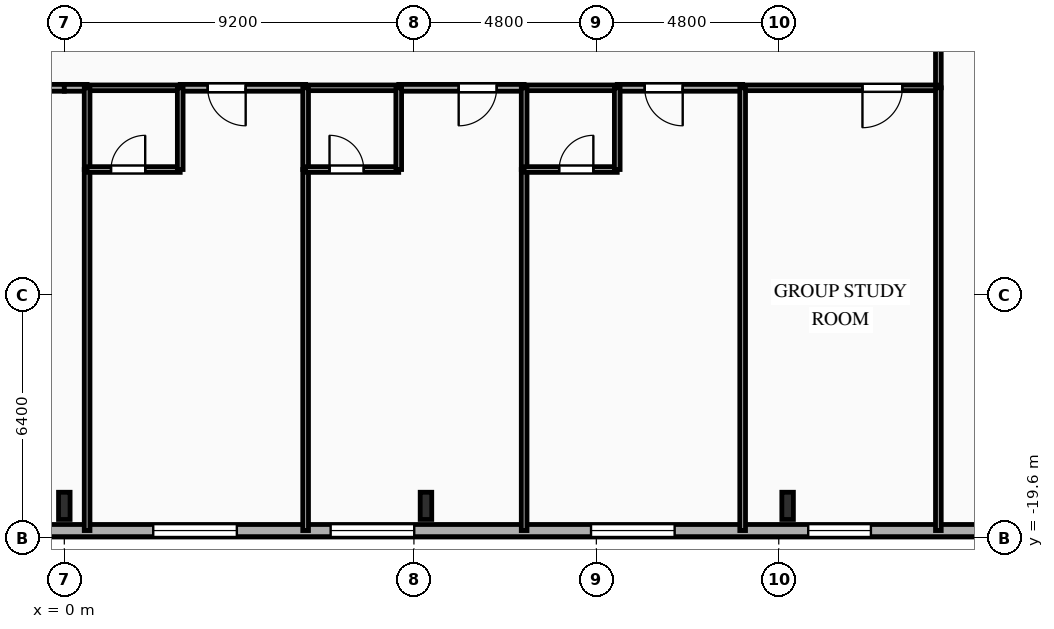
"""IFC4 building model, lengths in metres.
Left out: names, types, materials, properties, quantities, classifications, styles, units other than length and angle.
Written with IfcOpenShell. Run it as: python <this file> out.ifc"""

import sys

from ifc_helpers import new_model, si_unit, direction, frame, frame_2d, origin, origin_2d, place, context, subcontext, project, spatial, rectangle, i_section, extrude, element, fill, save


model = new_model("IFC4")
c1 = context("Model", 3, precision=1e-05, world=origin(), true_north=direction((0.0, 1.0)))
c2 = subcontext(c1, "Body", "Model", "MODEL_VIEW")
j1 = project(units=[si_unit("LENGTHUNIT", "METRE"), si_unit("PLANEANGLEUNIT", "RADIAN")], contexts=[c1])
p1 = place(None, origin())
s1 = spatial("IfcSite", under=j1, at=p1, CompositionType="ELEMENT")
p2 = place(p1, origin())
s2 = spatial("IfcBuilding", under=s1, at=p2, CompositionType="ELEMENT")
p3 = place(p2, frame((0.0, 0.0, 67.2)))
s3 = spatial("IfcBuildingStorey", under=s2, at=p3, CompositionType="ELEMENT", Elevation=67.2)
for number, where, z_axis, x_axis in (
    (1, (0.0, -18.75, 0.0), (0.0, 0.0, 1.0), (1.0, 0.0, 0.0)),
    (2, (9.517, -18.75, 0.0), (0.0, 0.0, 1.0), (1.0, 0.0, 0.0)),
    (3, (19.033, -18.75, 0.0), (0.0, 0.0, 1.0), (1.0, 0.0, 0.0)),
):
    element("IfcColumn", number, at=place(p3, frame(where, z_axis=z_axis, x_axis=x_axis)), inside=s3, PredefinedType="COLUMN", context=c2, shape_type="SweptSolid", body=[
        extrude(i_section(OverallWidth=0.304, OverallDepth=0.716, WebThickness=0.021, FlangeThickness=0.04, FilletRadius=0.027, at=origin_2d()), origin(), (0.0, 0.0, 1.0), 3.35),
    ])
p4 = place(p3, frame((29.2, -19.4, 0.0), z_axis=(0.0, 0.0, 1.0), x_axis=(-1.0, 0.0, 0.0)))
e4 = element("IfcWall", 4, at=p4, inside=s3, PredefinedType="SOLIDWALL", context=c2, shape_type="SweptSolid", body=[
    extrude(rectangle(XDim=58.4, YDim=0.32, at=frame_2d((29.2, 0.0))), origin(), (0.0, 0.0, 1.0), 3.035),
])
p5 = place(p4, frame((2.535, 0.0, 0.85)))
e5 = element("IfcOpeningElement", 5, at=p5, cuts=e4, PredefinedType="OPENING", context=c2, shape_type="SweptSolid", body=[
    extrude(rectangle(XDim=1.65, YDim=1.85, at=frame_2d((0.825, 0.925))), frame((0.0, 0.17, 0.0), z_axis=(0.0, -1.0, 0.0), x_axis=(1.0, 0.0, 0.0)), (0.0, 0.0, 1.0), 0.34),
])
p6 = place(p4, frame((7.975, 0.0, 0.85)))
e6 = element("IfcOpeningElement", 6, at=p6, cuts=e4, PredefinedType="OPENING", context=c2, shape_type="SweptSolid", body=[
    extrude(rectangle(XDim=1.65, YDim=1.85, at=frame_2d((0.825, 0.925))), frame((0.0, 0.17, 0.0), z_axis=(0.0, -1.0, 0.0), x_axis=(1.0, 0.0, 0.0)), (0.0, 0.0, 1.0), 0.34),
])
p7 = place(p4, frame((13.14, 0.0, 0.85)))
e7 = element("IfcOpeningElement", 7, at=p7, cuts=e4, PredefinedType="OPENING", context=c2, shape_type="SweptSolid", body=[
    extrude(rectangle(XDim=2.2, YDim=1.85, at=frame_2d((1.1, 0.925))), frame((0.0, 0.17, 0.0), z_axis=(0.0, -1.0, 0.0), x_axis=(1.0, 0.0, 0.0)), (0.0, 0.0, 1.0), 0.34),
])
p8 = place(p4, frame((19.992, 0.0, 0.85)))
e8 = element("IfcOpeningElement", 8, at=p8, cuts=e4, PredefinedType="OPENING", context=c2, shape_type="SweptSolid", body=[
    extrude(rectangle(XDim=2.2, YDim=1.85, at=frame_2d((1.1, 0.925))), frame((0.0, 0.17, 0.0), z_axis=(0.0, -1.0, 0.0), x_axis=(1.0, 0.0, 0.0)), (0.0, 0.0, 1.0), 0.34),
])
p9 = place(p4, frame((24.66, 0.0, 0.85)))
e9 = element("IfcOpeningElement", 9, at=p9, cuts=e4, PredefinedType="OPENING", context=c2, shape_type="SweptSolid", body=[
    extrude(rectangle(XDim=2.2, YDim=1.85, at=frame_2d((1.1, 0.925))), frame((0.0, 0.17, 0.0), z_axis=(0.0, -1.0, 0.0), x_axis=(1.0, 0.0, 0.0)), (0.0, 0.0, 1.0), 0.34),
])
p10 = place(p4, frame((30.42, 0.0, 0.85)))
e10 = element("IfcOpeningElement", 10, at=p10, cuts=e4, PredefinedType="OPENING", context=c2, shape_type="SweptSolid", body=[
    extrude(rectangle(XDim=2.2, YDim=1.85, at=frame_2d((1.1, 0.925))), frame((0.0, 0.17, 0.0), z_axis=(0.0, -1.0, 0.0), x_axis=(1.0, 0.0, 0.0)), (0.0, 0.0, 1.0), 0.34),
])
p11 = place(p4, frame((36.18, 0.0, 0.85)))
e11 = element("IfcOpeningElement", 11, at=p11, cuts=e4, PredefinedType="OPENING", context=c2, shape_type="SweptSolid", body=[
    extrude(rectangle(XDim=2.2, YDim=1.85, at=frame_2d((1.1, 0.925))), frame((0.0, 0.17, 0.0), z_axis=(0.0, -1.0, 0.0), x_axis=(1.0, 0.0, 0.0)), (0.0, 0.0, 1.0), 0.34),
])
p12 = place(p4, frame((41.94, 0.0, 0.85)))
e12 = element("IfcOpeningElement", 12, at=p12, cuts=e4, PredefinedType="OPENING", context=c2, shape_type="SweptSolid", body=[
    extrude(rectangle(XDim=2.2, YDim=1.85, at=frame_2d((1.1, 0.925))), frame((0.0, 0.17, 0.0), z_axis=(0.0, -1.0, 0.0), x_axis=(1.0, 0.0, 0.0)), (0.0, 0.0, 1.0), 0.34),
])
p13 = place(p4, frame((48.821, 0.0, 0.85)))
e13 = element("IfcOpeningElement", 13, at=p13, cuts=e4, PredefinedType="OPENING", context=c2, shape_type="SweptSolid", body=[
    extrude(rectangle(XDim=1.65, YDim=1.85, at=frame_2d((0.825, 0.925))), frame((0.0, 0.17, 0.0), z_axis=(0.0, -1.0, 0.0), x_axis=(1.0, 0.0, 0.0)), (0.0, 0.0, 1.0), 0.34),
])
p14 = place(p4, frame((53.775, 0.0, 0.85)))
e14 = element("IfcOpeningElement", 14, at=p14, cuts=e4, PredefinedType="OPENING", context=c2, shape_type="SweptSolid", body=[
    extrude(rectangle(XDim=1.65, YDim=1.85, at=frame_2d((0.825, 0.925))), frame((0.0, 0.17, 0.0), z_axis=(0.0, -1.0, 0.0), x_axis=(1.0, 0.0, 0.0)), (0.0, 0.0, 1.0), 0.34),
])
p15 = place(p3, frame((0.0, -7.75, 0.0), z_axis=(0.0, 0.0, 1.0), x_axis=(-1.0, 0.0, 0.0)))
e15 = element("IfcWall", 15, at=p15, inside=s3, PredefinedType="PARTITIONING", context=c2, shape_type="SweptSolid", body=[
    extrude(rectangle(XDim=2.7, YDim=0.18, at=frame_2d((1.35, 0.0))), origin(), (0.0, 0.0, 1.0), 3.035),
])
p16 = place(p15, frame((0.647, 0.0, 0.0)))
e16 = element("IfcOpeningElement", 16, at=p16, cuts=e15, PredefinedType="OPENING", context=c2, shape_type="SweptSolid", body=[
    extrude(rectangle(XDim=1.0, YDim=2.15, at=frame_2d((0.5, 1.075))), frame((0.0, 0.1, 0.0), z_axis=(0.0, -1.0, 0.0), x_axis=(1.0, 0.0, 0.0)), (0.0, 0.0, 1.0), 0.2),
])
p17 = place(p3, frame((23.0, -5.6, 0.0), z_axis=(0.0, 0.0, 1.0), x_axis=(0.0, -1.0, 0.0)))
e17 = element("IfcWall", 17, at=p17, inside=s3, PredefinedType="PARTITIONING", context=c2, shape_type="SweptSolid", body=[
    extrude(rectangle(XDim=2.15, YDim=0.15, at=frame_2d((1.075, 0.0))), origin(), (0.0, 0.0, 1.0), 3.035),
])
p18 = place(p3, frame((0.6, -7.75, 0.0), z_axis=(0.0, 0.0, 1.0), x_axis=(-1.0, 0.0, 0.0)))
e18 = element("IfcWall", 18, at=p18, inside=s3, PredefinedType="PARTITIONING", context=c2, shape_type="SweptSolid", body=[
    extrude(rectangle(XDim=0.6, YDim=0.18, at=frame_2d((0.3, 0.0))), origin(), (0.0, 0.0, 1.0), 3.035),
])
p19 = place(p3, frame((6.35, -7.75, 0.0), z_axis=(0.0, 0.0, 1.0), x_axis=(-1.0, 0.0, 0.0)))
e19 = element("IfcWall", 19, at=p19, inside=s3, PredefinedType="PARTITIONING", context=c2, shape_type="SweptSolid", body=[
    extrude(rectangle(XDim=3.3, YDim=0.18, at=frame_2d((1.65, 0.0))), origin(), (0.0, 0.0, 1.0), 3.035),
])
p20 = place(p19, frame((1.577, 0.0, 0.0)))
e20 = element("IfcOpeningElement", 20, at=p20, cuts=e19, PredefinedType="OPENING", context=c2, shape_type="SweptSolid", body=[
    extrude(rectangle(XDim=1.0, YDim=2.15, at=frame_2d((0.5, 1.075))), frame((0.0, 0.1, 0.0), z_axis=(0.0, -1.0, 0.0), x_axis=(1.0, 0.0, 0.0)), (0.0, 0.0, 1.0), 0.2),
])
p21 = place(p3, frame((3.05, -7.75, 0.0), z_axis=(0.0, 0.0, 1.0), x_axis=(-1.0, 0.0, 0.0)))
e21 = element("IfcWall", 21, at=p21, inside=s3, PredefinedType="PLUMBINGWALL", context=c2, shape_type="SweptSolid", body=[
    extrude(rectangle(XDim=2.45, YDim=0.15, at=frame_2d((1.225, 0.0))), origin(), (0.0, 0.0, 1.0), 3.035),
])
p22 = place(p3, frame((12.1, -7.75, 0.0), z_axis=(0.0, 0.0, 1.0), x_axis=(-1.0, 0.0, 0.0)))
e22 = element("IfcWall", 22, at=p22, inside=s3, PredefinedType="PARTITIONING", context=c2, shape_type="SweptSolid", body=[
    extrude(rectangle(XDim=3.3, YDim=0.18, at=frame_2d((1.65, 0.0))), origin(), (0.0, 0.0, 1.0), 3.035),
])
p23 = place(p22, frame((0.722, 0.0, 0.0)))
e23 = element("IfcOpeningElement", 23, at=p23, cuts=e22, PredefinedType="OPENING", context=c2, shape_type="SweptSolid", body=[
    extrude(rectangle(XDim=1.0, YDim=2.15, at=frame_2d((0.5, 1.075))), frame((0.0, 0.1, 0.0), z_axis=(0.0, -1.0, 0.0), x_axis=(1.0, 0.0, 0.0)), (0.0, 0.0, 1.0), 0.2),
])
p24 = place(p3, frame((8.8, -7.75, 0.0), z_axis=(0.0, 0.0, 1.0), x_axis=(-1.0, 0.0, 0.0)))
e24 = element("IfcWall", 24, at=p24, inside=s3, PredefinedType="PLUMBINGWALL", context=c2, shape_type="SweptSolid", body=[
    extrude(rectangle(XDim=2.45, YDim=0.15, at=frame_2d((1.225, 0.0))), origin(), (0.0, 0.0, 1.0), 3.035),
])
p25 = place(p3, frame((17.85, -7.75, 0.0), z_axis=(0.0, 0.0, 1.0), x_axis=(-1.0, 0.0, 0.0)))
e25 = element("IfcWall", 25, at=p25, inside=s3, PredefinedType="PARTITIONING", context=c2, shape_type="SweptSolid", body=[
    extrude(rectangle(XDim=3.3, YDim=0.18, at=frame_2d((1.65, 0.0))), origin(), (0.0, 0.0, 1.0), 3.035),
])
p26 = place(p25, frame((1.577, 0.0, 0.0)))
e26 = element("IfcOpeningElement", 26, at=p26, cuts=e25, PredefinedType="OPENING", context=c2, shape_type="SweptSolid", body=[
    extrude(rectangle(XDim=1.0, YDim=2.15, at=frame_2d((0.5, 1.075))), frame((0.0, 0.1, 0.0), z_axis=(0.0, -1.0, 0.0), x_axis=(1.0, 0.0, 0.0)), (0.0, 0.0, 1.0), 0.2),
])
p27 = place(p3, frame((14.55, -7.75, 0.0), z_axis=(0.0, 0.0, 1.0), x_axis=(-1.0, 0.0, 0.0)))
e27 = element("IfcWall", 27, at=p27, inside=s3, PredefinedType="PLUMBINGWALL", context=c2, shape_type="SweptSolid", body=[
    extrude(rectangle(XDim=2.45, YDim=0.15, at=frame_2d((1.225, 0.0))), origin(), (0.0, 0.0, 1.0), 3.035),
])
p28 = place(p3, frame((23.0, -7.75, 0.0), z_axis=(0.0, 0.0, 1.0), x_axis=(-1.0, 0.0, 0.0)))
e28 = element("IfcWall", 28, at=p28, inside=s3, PredefinedType="PARTITIONING", context=c2, shape_type="SweptSolid", body=[
    extrude(rectangle(XDim=5.15, YDim=0.15, at=frame_2d((2.575, 0.0))), origin(), (0.0, 0.0, 1.0), 3.035),
])
p29 = place(p28, frame((0.948, 0.0, 0.0)))
e29 = element("IfcOpeningElement", 29, at=p29, cuts=e28, PredefinedType="OPENING", context=c2, shape_type="SweptSolid", body=[
    extrude(rectangle(XDim=1.05, YDim=2.15, at=frame_2d((0.525, 1.075))), frame((0.0, 0.085, 0.0), z_axis=(0.0, -1.0, 0.0), x_axis=(1.0, 0.0, 0.0)), (0.0, 0.0, 1.0), 0.17),
])
p30 = place(p3, frame((23.0, -19.4, 0.0), z_axis=(0.0, 0.0, 1.0), x_axis=(0.0, 1.0, 0.0)))
e30 = element("IfcWall", 30, at=p30, inside=s3, PredefinedType="PARTITIONING", context=c2, shape_type="SweptSolid", body=[
    extrude(rectangle(XDim=11.65, YDim=0.15, at=frame_2d((5.825, 0.0))), origin(), (0.0, 0.0, 1.0), 3.035),
])
p31 = place(p3, frame((0.6, -9.9, 0.0), z_axis=(0.0, 0.0, 1.0), x_axis=(0.0, -1.0, 0.0)))
e31 = element("IfcWall", 31, at=p31, inside=s3, PredefinedType="PARTITIONING", context=c2, shape_type="SweptSolid", body=[
    extrude(rectangle(XDim=9.5, YDim=0.15, at=frame_2d((4.75, 0.0))), origin(), (0.0, 0.0, 1.0), 3.035),
])
p32 = place(p3, frame((0.6, -7.75, 0.0), z_axis=(0.0, 0.0, 1.0), x_axis=(0.0, -1.0, 0.0)))
e32 = element("IfcWall", 32, at=p32, inside=s3, PredefinedType="PLUMBINGWALL", context=c2, shape_type="SweptSolid", body=[
    extrude(rectangle(XDim=2.15, YDim=0.15, at=frame_2d((1.075, 0.0))), origin(), (0.0, 0.0, 1.0), 3.035),
])
p33 = place(p3, frame((0.6, -9.9, 0.0), z_axis=(0.0, 0.0, 1.0), x_axis=(1.0, 0.0, 0.0)))
e33 = element("IfcWall", 33, at=p33, inside=s3, PredefinedType="PLUMBINGWALL", context=c2, shape_type="SweptSolid", body=[
    extrude(rectangle(XDim=2.45, YDim=0.15, at=frame_2d((1.225, 0.0))), origin(), (0.0, 0.0, 1.0), 3.035),
])
p34 = place(p33, frame((0.629, 0.0, 0.0)))
e34 = element("IfcOpeningElement", 34, at=p34, cuts=e33, PredefinedType="OPENING", context=c2, shape_type="SweptSolid", body=[
    extrude(rectangle(XDim=0.9, YDim=2.1, at=frame_2d((0.45, 1.05))), frame((0.0, 0.085, 0.0), z_axis=(0.0, -1.0, 0.0), x_axis=(1.0, 0.0, 0.0)), (0.0, 0.0, 1.0), 0.17),
])
p35 = place(p3, frame((3.05, -9.9, 0.0), z_axis=(0.0, 0.0, 1.0), x_axis=(0.0, 1.0, 0.0)))
e35 = element("IfcWall", 35, at=p35, inside=s3, PredefinedType="PLUMBINGWALL", context=c2, shape_type="SweptSolid", body=[
    extrude(rectangle(XDim=2.15, YDim=0.15, at=frame_2d((1.075, 0.0))), origin(), (0.0, 0.0, 1.0), 3.035),
])
p36 = place(p3, frame((6.35, -9.9, 0.0), z_axis=(0.0, 0.0, 1.0), x_axis=(0.0, -1.0, 0.0)))
e36 = element("IfcWall", 36, at=p36, inside=s3, PredefinedType="PARTITIONING", context=c2, shape_type="SweptSolid", body=[
    extrude(rectangle(XDim=9.5, YDim=0.15, at=frame_2d((4.75, 0.0))), origin(), (0.0, 0.0, 1.0), 3.035),
])
p37 = place(p3, frame((6.35, -7.75, 0.0), z_axis=(0.0, 0.0, 1.0), x_axis=(0.0, -1.0, 0.0)))
e37 = element("IfcWall", 37, at=p37, inside=s3, PredefinedType="PLUMBINGWALL", context=c2, shape_type="SweptSolid", body=[
    extrude(rectangle(XDim=2.15, YDim=0.15, at=frame_2d((1.075, 0.0))), origin(), (0.0, 0.0, 1.0), 3.035),
])
p38 = place(p3, frame((6.35, -9.9, 0.0), z_axis=(0.0, 0.0, 1.0), x_axis=(1.0, 0.0, 0.0)))
e38 = element("IfcWall", 38, at=p38, inside=s3, PredefinedType="PLUMBINGWALL", context=c2, shape_type="SweptSolid", body=[
    extrude(rectangle(XDim=2.45, YDim=0.15, at=frame_2d((1.225, 0.0))), origin(), (0.0, 0.0, 1.0), 3.035),
])
p39 = place(p38, frame((0.629, 0.0, 0.0)))
e39 = element("IfcOpeningElement", 39, at=p39, cuts=e38, PredefinedType="OPENING", context=c2, shape_type="SweptSolid", body=[
    extrude(rectangle(XDim=0.9, YDim=2.1, at=frame_2d((0.45, 1.05))), frame((0.0, 0.085, 0.0), z_axis=(0.0, -1.0, 0.0), x_axis=(1.0, 0.0, 0.0)), (0.0, 0.0, 1.0), 0.17),
])
p40 = place(p3, frame((8.8, -9.9, 0.0), z_axis=(0.0, 0.0, 1.0), x_axis=(0.0, 1.0, 0.0)))
e40 = element("IfcWall", 40, at=p40, inside=s3, PredefinedType="PLUMBINGWALL", context=c2, shape_type="SweptSolid", body=[
    extrude(rectangle(XDim=2.15, YDim=0.15, at=frame_2d((1.075, 0.0))), origin(), (0.0, 0.0, 1.0), 3.035),
])
p41 = place(p3, frame((12.1, -9.9, 0.0), z_axis=(0.0, 0.0, 1.0), x_axis=(0.0, -1.0, 0.0)))
e41 = element("IfcWall", 41, at=p41, inside=s3, PredefinedType="PARTITIONING", context=c2, shape_type="SweptSolid", body=[
    extrude(rectangle(XDim=9.5, YDim=0.15, at=frame_2d((4.75, 0.0))), origin(), (0.0, 0.0, 1.0), 3.035),
])
p42 = place(p3, frame((12.1, -7.75, 0.0), z_axis=(0.0, 0.0, 1.0), x_axis=(0.0, -1.0, 0.0)))
e42 = element("IfcWall", 42, at=p42, inside=s3, PredefinedType="PLUMBINGWALL", context=c2, shape_type="SweptSolid", body=[
    extrude(rectangle(XDim=2.15, YDim=0.15, at=frame_2d((1.075, 0.0))), origin(), (0.0, 0.0, 1.0), 3.035),
])
p43 = place(p3, frame((12.1, -9.9, 0.0), z_axis=(0.0, 0.0, 1.0), x_axis=(1.0, 0.0, 0.0)))
e43 = element("IfcWall", 43, at=p43, inside=s3, PredefinedType="PLUMBINGWALL", context=c2, shape_type="SweptSolid", body=[
    extrude(rectangle(XDim=2.45, YDim=0.15, at=frame_2d((1.225, 0.0))), origin(), (0.0, 0.0, 1.0), 3.035),
])
p44 = place(p43, frame((0.921, 0.0, 0.0)))
e44 = element("IfcOpeningElement", 44, at=p44, cuts=e43, PredefinedType="OPENING", context=c2, shape_type="SweptSolid", body=[
    extrude(rectangle(XDim=0.9, YDim=2.1, at=frame_2d((0.45, 1.05))), frame((0.0, 0.085, 0.0), z_axis=(0.0, -1.0, 0.0), x_axis=(1.0, 0.0, 0.0)), (0.0, 0.0, 1.0), 0.17),
])
p45 = place(p3, frame((14.55, -9.9, 0.0), z_axis=(0.0, 0.0, 1.0), x_axis=(0.0, 1.0, 0.0)))
e45 = element("IfcWall", 45, at=p45, inside=s3, PredefinedType="PLUMBINGWALL", context=c2, shape_type="SweptSolid", body=[
    extrude(rectangle(XDim=2.15, YDim=0.15, at=frame_2d((1.075, 0.0))), origin(), (0.0, 0.0, 1.0), 3.035),
])
p46 = place(p3, frame((17.85, -7.75, 0.0), z_axis=(0.0, 0.0, 1.0), x_axis=(0.0, -1.0, 0.0)))
e46 = element("IfcWall", 46, at=p46, inside=s3, PredefinedType="PARTITIONING", context=c2, shape_type="SweptSolid", body=[
    extrude(rectangle(XDim=11.65, YDim=0.15, at=frame_2d((5.825, 0.0))), origin(), (0.0, 0.0, 1.0), 3.035),
])
p47 = place(p6, origin())
e47 = element("IfcWindow", 47, at=p47, inside=s3, PartitioningType="SINGLE_PANEL", PredefinedType="WINDOW", context=c2, shape_type="SweptSolid", body=[
    extrude(rectangle(XDim=1.65, YDim=1.85, at=frame_2d((0.825, 0.925))), frame((0.0, 0.03, 0.0), z_axis=(0.0, -1.0, 0.0), x_axis=(1.0, 0.0, 0.0)), (0.0, 0.0, 1.0), 0.06),
])
fill(e6, e47)
p48 = place(p7, origin())
e48 = element("IfcWindow", 48, at=p48, inside=s3, PartitioningType="SINGLE_PANEL", PredefinedType="WINDOW", context=c2, shape_type="SweptSolid", body=[
    extrude(rectangle(XDim=2.2, YDim=1.85, at=frame_2d((1.1, 0.925))), frame((0.0, 0.03, 0.0), z_axis=(0.0, -1.0, 0.0), x_axis=(1.0, 0.0, 0.0)), (0.0, 0.0, 1.0), 0.06),
])
fill(e7, e48)
p49 = place(p8, origin())
e49 = element("IfcWindow", 49, at=p49, inside=s3, PartitioningType="SINGLE_PANEL", PredefinedType="WINDOW", context=c2, shape_type="SweptSolid", body=[
    extrude(rectangle(XDim=2.2, YDim=1.85, at=frame_2d((1.1, 0.925))), frame((0.0, 0.03, 0.0), z_axis=(0.0, -1.0, 0.0), x_axis=(1.0, 0.0, 0.0)), (0.0, 0.0, 1.0), 0.06),
])
fill(e8, e49)
p50 = place(p9, origin())
e50 = element("IfcWindow", 50, at=p50, inside=s3, PartitioningType="SINGLE_PANEL", PredefinedType="WINDOW", context=c2, shape_type="SweptSolid", body=[
    extrude(rectangle(XDim=2.2, YDim=1.85, at=frame_2d((1.1, 0.925))), frame((0.0, 0.03, 0.0), z_axis=(0.0, -1.0, 0.0), x_axis=(1.0, 0.0, 0.0)), (0.0, 0.0, 1.0), 0.06),
])
fill(e9, e50)
p51 = place(p20, origin())
e51 = element("IfcDoor", 51, at=p51, inside=s3, OperationType="SINGLE_SWING_LEFT", PredefinedType="DOOR", context=c2, shape_type="SweptSolid", body=[
    extrude(rectangle(XDim=1.0, YDim=2.15, at=frame_2d((0.5, 1.075))), frame((0.0, 0.025, 0.0), z_axis=(0.0, -1.0, 0.0), x_axis=(1.0, 0.0, 0.0)), (0.0, 0.0, 1.0), 0.05),
])
fill(e20, e51)
p52 = place(p23, origin())
e52 = element("IfcDoor", 52, at=p52, inside=s3, OperationType="SINGLE_SWING_RIGHT", PredefinedType="DOOR", context=c2, shape_type="SweptSolid", body=[
    extrude(rectangle(XDim=1.0, YDim=2.15, at=frame_2d((0.5, 1.075))), frame((0.0, 0.025, 0.0), z_axis=(0.0, -1.0, 0.0), x_axis=(1.0, 0.0, 0.0)), (0.0, 0.0, 1.0), 0.05),
])
fill(e23, e52)
p53 = place(p26, origin())
e53 = element("IfcDoor", 53, at=p53, inside=s3, OperationType="SINGLE_SWING_LEFT", PredefinedType="DOOR", context=c2, shape_type="SweptSolid", body=[
    extrude(rectangle(XDim=1.0, YDim=2.15, at=frame_2d((0.5, 1.075))), frame((0.0, 0.025, 0.0), z_axis=(0.0, -1.0, 0.0), x_axis=(1.0, 0.0, 0.0)), (0.0, 0.0, 1.0), 0.05),
])
fill(e26, e53)
p54 = place(p29, origin())
e54 = element("IfcDoor", 54, at=p54, inside=s3, OperationType="SINGLE_SWING_RIGHT", PredefinedType="DOOR", context=c2, shape_type="SweptSolid", body=[
    extrude(rectangle(XDim=1.05, YDim=2.15, at=frame_2d((0.525, 1.075))), frame((0.0, 0.025, 0.0), z_axis=(0.0, -1.0, 0.0), x_axis=(1.0, 0.0, 0.0)), (0.0, 0.0, 1.0), 0.05),
])
fill(e29, e54)
p55 = place(p34, origin())
e55 = element("IfcDoor", 55, at=p55, inside=s3, OperationType="SINGLE_SWING_RIGHT", PredefinedType="DOOR", context=c2, shape_type="SweptSolid", body=[
    extrude(rectangle(XDim=0.9, YDim=2.1, at=frame_2d((0.45, 1.05))), frame((0.0, 0.025, 0.0), z_axis=(0.0, -1.0, 0.0), x_axis=(1.0, 0.0, 0.0)), (0.0, 0.0, 1.0), 0.05),
])
fill(e34, e55)
p56 = place(p39, origin())
e56 = element("IfcDoor", 56, at=p56, inside=s3, OperationType="SINGLE_SWING_LEFT", PredefinedType="DOOR", context=c2, shape_type="SweptSolid", body=[
    extrude(rectangle(XDim=0.9, YDim=2.1, at=frame_2d((0.45, 1.05))), frame((0.0, 0.025, 0.0), z_axis=(0.0, -1.0, 0.0), x_axis=(1.0, 0.0, 0.0)), (0.0, 0.0, 1.0), 0.05),
])
fill(e39, e56)
p57 = place(p44, origin())
e57 = element("IfcDoor", 57, at=p57, inside=s3, OperationType="SINGLE_SWING_RIGHT", PredefinedType="DOOR", context=c2, shape_type="SweptSolid", body=[
    extrude(rectangle(XDim=0.9, YDim=2.1, at=frame_2d((0.45, 1.05))), frame((0.0, 0.025, 0.0), z_axis=(0.0, -1.0, 0.0), x_axis=(1.0, 0.0, 0.0)), (0.0, 0.0, 1.0), 0.05),
])
fill(e44, e57)
save(model, sys.argv[1])
